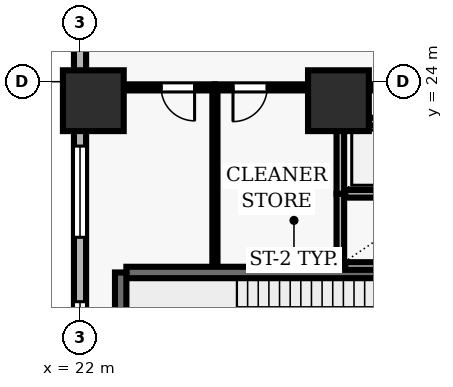
"""IFC4 building model, lengths in metres.
Left out: names, types, materials, properties, quantities, classifications, styles, units other than length and angle.
Written with IfcOpenShell. Run it as: python <this file> out.ifc"""

import sys

from ifc_helpers import new_model, si_unit, direction, frame, frame_2d, origin, origin_2d, place, context, subcontext, project, spatial, rectangle, extrude, element, fill, save


model = new_model("IFC4")
c1 = context("Model", 3, precision=1e-05, world=origin(), true_north=direction((0.0, 1.0)))
c2 = subcontext(c1, "Body", "Model", "MODEL_VIEW")
j1 = project(units=[si_unit("LENGTHUNIT", "METRE"), si_unit("PLANEANGLEUNIT", "RADIAN")], contexts=[c1])
p1 = place(None, origin())
s1 = spatial("IfcSite", under=j1, at=p1, CompositionType="ELEMENT")
p2 = place(p1, origin())
s2 = spatial("IfcBuilding", under=s1, at=p2, CompositionType="ELEMENT")
p3 = place(p2, frame((0.0, 0.0, 5.2)))
s3 = spatial("IfcBuildingStorey", under=s2, at=p3, CompositionType="ELEMENT", Elevation=5.2)
for number, where, z_axis, x_axis in (
    (1, (22.35, 23.5, 0.0), (0.0, 0.0, 1.0), (1.0, 0.0, 0.0)),
    (2, (28.8, 23.5, 0.0), (0.0, 0.0, 1.0), (1.0, 0.0, 0.0)),
):
    element("IfcColumn", number, at=place(p3, frame(where, z_axis=z_axis, x_axis=x_axis)), inside=s3, PredefinedType="COLUMN", context=c2, shape_type="SweptSolid", body=[
        extrude(rectangle(XDim=1.6, YDim=1.6, at=origin_2d()), origin(), (0.0, 0.0, 1.0), 5.2),
    ])
p4 = place(p3, frame((22.0, 51.5, 0.0), z_axis=(0.0, 0.0, 1.0), x_axis=(0.0, -1.0, 0.0)))
e3 = element("IfcWall", 3, at=p4, inside=s3, PredefinedType="SOLIDWALL", context=c2, shape_type="SweptSolid", body=[
    extrude(rectangle(XDim=49.0, YDim=0.32, at=frame_2d((24.5, 0.0))), origin(), (0.0, 0.0, 1.0), 4.92),
])
p5 = place(p4, frame((1.522, 0.0, 0.9)))
e4 = element("IfcOpeningElement", 4, at=p5, cuts=e3, PredefinedType="OPENING", context=c2, shape_type="SweptSolid", body=[
    extrude(rectangle(XDim=2.4, YDim=2.2, at=frame_2d((1.2, 1.1))), frame((0.0, 0.17, 0.0), z_axis=(0.0, -1.0, 0.0), x_axis=(1.0, 0.0, 0.0)), (0.0, 0.0, 1.0), 0.34),
])
p6 = place(p4, frame((6.967, 0.0, 0.9)))
e5 = element("IfcOpeningElement", 5, at=p6, cuts=e3, PredefinedType="OPENING", context=c2, shape_type="SweptSolid", body=[
    extrude(rectangle(XDim=2.4, YDim=2.2, at=frame_2d((1.2, 1.1))), frame((0.0, 0.17, 0.0), z_axis=(0.0, -1.0, 0.0), x_axis=(1.0, 0.0, 0.0)), (0.0, 0.0, 1.0), 0.34),
])
p7 = place(p4, frame((11.961, 0.0, 0.9)))
e6 = element("IfcOpeningElement", 6, at=p7, cuts=e3, PredefinedType="OPENING", context=c2, shape_type="SweptSolid", body=[
    extrude(rectangle(XDim=2.4, YDim=2.2, at=frame_2d((1.2, 1.1))), frame((0.0, 0.17, 0.0), z_axis=(0.0, -1.0, 0.0), x_axis=(1.0, 0.0, 0.0)), (0.0, 0.0, 1.0), 0.34),
])
p8 = place(p4, frame((17.856, 0.0, 0.9)))
e7 = element("IfcOpeningElement", 7, at=p8, cuts=e3, PredefinedType="OPENING", context=c2, shape_type="SweptSolid", body=[
    extrude(rectangle(XDim=2.4, YDim=2.2, at=frame_2d((1.2, 1.1))), frame((0.0, 0.17, 0.0), z_axis=(0.0, -1.0, 0.0), x_axis=(1.0, 0.0, 0.0)), (0.0, 0.0, 1.0), 0.34),
])
p9 = place(p4, frame((22.4, 0.0, 0.9)))
e8 = element("IfcOpeningElement", 8, at=p9, cuts=e3, PredefinedType="OPENING", context=c2, shape_type="SweptSolid", body=[
    extrude(rectangle(XDim=2.4, YDim=2.2, at=frame_2d((1.2, 1.1))), frame((0.0, 0.17, 0.0), z_axis=(0.0, -1.0, 0.0), x_axis=(1.0, 0.0, 0.0)), (0.0, 0.0, 1.0), 0.34),
])
p10 = place(p4, frame((29.194, 0.0, 0.9)))
e9 = element("IfcOpeningElement", 9, at=p10, cuts=e3, PredefinedType="OPENING", context=c2, shape_type="SweptSolid", body=[
    extrude(rectangle(XDim=2.4, YDim=2.2, at=frame_2d((1.2, 1.1))), frame((0.0, 0.17, 0.0), z_axis=(0.0, -1.0, 0.0), x_axis=(1.0, 0.0, 0.0)), (0.0, 0.0, 1.0), 0.34),
])
p11 = place(p4, frame((33.289, 0.0, 0.9)))
e10 = element("IfcOpeningElement", 10, at=p11, cuts=e3, PredefinedType="OPENING", context=c2, shape_type="SweptSolid", body=[
    extrude(rectangle(XDim=2.4, YDim=2.2, at=frame_2d((1.2, 1.1))), frame((0.0, 0.17, 0.0), z_axis=(0.0, -1.0, 0.0), x_axis=(1.0, 0.0, 0.0)), (0.0, 0.0, 1.0), 0.34),
])
p12 = place(p4, frame((39.633, 0.0, 0.9)))
e11 = element("IfcOpeningElement", 11, at=p12, cuts=e3, PredefinedType="OPENING", context=c2, shape_type="SweptSolid", body=[
    extrude(rectangle(XDim=2.4, YDim=2.2, at=frame_2d((1.2, 1.1))), frame((0.0, 0.17, 0.0), z_axis=(0.0, -1.0, 0.0), x_axis=(1.0, 0.0, 0.0)), (0.0, 0.0, 1.0), 0.34),
])
p13 = place(p3, frame((31.58, 18.98, 0.0), z_axis=(0.0, 0.0, 1.0), x_axis=(-1.0, 0.0, 0.0)))
e12 = element("IfcWall", 12, at=p13, inside=s3, PredefinedType="SHEAR", context=c2, shape_type="SweptSolid", body=[
    extrude(rectangle(XDim=8.36, YDim=0.3, at=frame_2d((4.18, 0.0))), origin(), (0.0, 0.0, 1.0), 4.92),
])
p14 = place(p3, frame((23.07, 18.98, 0.0), z_axis=(0.0, 0.0, 1.0), x_axis=(0.0, -1.0, 0.0)))
e13 = element("IfcWall", 13, at=p14, inside=s3, PredefinedType="SHEAR", context=c2, shape_type="SweptSolid", body=[
    extrude(rectangle(XDim=3.51, YDim=0.3, at=frame_2d((1.755, 0.0))), origin(), (0.0, 0.0, 1.0), 4.92),
])
p15 = place(p3, frame((28.85, 21.05, 0.0), z_axis=(0.0, 0.0, 1.0), x_axis=(0.0, -1.0, 0.0)))
e14 = element("IfcWall", 14, at=p15, inside=s3, PredefinedType="SOLIDWALL", context=c2, shape_type="SweptSolid", body=[
    extrude(rectangle(XDim=1.9, YDim=0.2, at=frame_2d((0.95, 0.0))), origin(), (0.0, 0.0, 1.0), 4.92),
])
for number, where, z_axis, x_axis in (
    (15, (28.98, 19.15, 0.0), (0.0, 0.0, 1.0), (1.0, 0.0, 0.0)),
    (16, (31.42, 21.05, 0.0), (0.0, 0.0, 1.0), (-1.0, 0.0, 0.0)),
):
    element("IfcWall", number, at=place(p3, frame(where, z_axis=z_axis, x_axis=x_axis)), inside=s3, PredefinedType="SOLIDWALL", context=c2, shape_type="SweptSolid", body=[
        extrude(rectangle(XDim=2.44, YDim=0.2, at=frame_2d((1.22, 0.0))), origin(), (0.0, 0.0, 1.0), 4.92),
    ])
p16 = place(p3, frame((28.85, 22.95, 0.0), z_axis=(0.0, 0.0, 1.0), x_axis=(0.0, -1.0, 0.0)))
e17 = element("IfcWall", 17, at=p16, inside=s3, PredefinedType="SOLIDWALL", context=c2, shape_type="SweptSolid", body=[
    extrude(rectangle(XDim=1.9, YDim=0.2, at=frame_2d((0.95, 0.0))), origin(), (0.0, 0.0, 1.0), 4.92),
])
p17 = place(p3, frame((31.43, 22.95, 0.0), z_axis=(0.0, 0.0, 1.0), x_axis=(-1.0, 0.0, 0.0)))
e18 = element("IfcWall", 18, at=p17, inside=s3, PredefinedType="SOLIDWALL", context=c2, shape_type="SweptSolid", body=[
    extrude(rectangle(XDim=2.46, YDim=0.2, at=frame_2d((1.23, 0.0))), origin(), (0.0, 0.0, 1.0), 4.92),
])
p18 = place(p3, frame((25.55, 23.85, 0.0), z_axis=(0.0, 0.0, 1.0), x_axis=(-1.0, 0.0, 0.0)))
e19 = element("IfcWall", 19, at=p18, inside=s3, PredefinedType="PARTITIONING", context=c2, shape_type="SweptSolid", body=[
    extrude(rectangle(XDim=3.35, YDim=0.16, at=frame_2d((1.675, 0.0))), origin(), (0.0, 0.0, 1.0), 4.065),
])
p19 = place(p18, frame((0.535, 0.0, 0.0)))
e20 = element("IfcOpeningElement", 20, at=p19, cuts=e19, PredefinedType="OPENING", context=c2, shape_type="SweptSolid", body=[
    extrude(rectangle(XDim=0.88, YDim=2.1, at=frame_2d((0.44, 1.05))), frame((0.0, 0.09, 0.0), z_axis=(0.0, -1.0, 0.0), x_axis=(1.0, 0.0, 0.0)), (0.0, 0.0, 1.0), 0.18),
])
p20 = place(p3, frame((28.8, 23.85, 0.0), z_axis=(0.0, 0.0, 1.0), x_axis=(-1.0, 0.0, 0.0)))
e21 = element("IfcWall", 21, at=p20, inside=s3, PredefinedType="PARTITIONING", context=c2, shape_type="SweptSolid", body=[
    extrude(rectangle(XDim=3.25, YDim=0.16, at=frame_2d((1.625, 0.0))), origin(), (0.0, 0.0, 1.0), 4.065),
])
p21 = place(p20, frame((1.875, 0.0, 0.0)))
e22 = element("IfcOpeningElement", 22, at=p21, cuts=e21, PredefinedType="OPENING", context=c2, shape_type="SweptSolid", body=[
    extrude(rectangle(XDim=0.9, YDim=2.1, at=frame_2d((0.45, 1.05))), frame((0.0, 0.09, 0.0), z_axis=(0.0, -1.0, 0.0), x_axis=(1.0, 0.0, 0.0)), (0.0, 0.0, 1.0), 0.18),
])
p22 = place(p3, frame((28.8, 23.85, 0.0), z_axis=(0.0, 0.0, 1.0), x_axis=(1.0, 0.0, 0.0)))
e23 = element("IfcWall", 23, at=p22, inside=s3, PredefinedType="PARTITIONING", context=c2, shape_type="SweptSolid", body=[
    extrude(rectangle(XDim=2.85, YDim=0.16, at=frame_2d((1.425, 0.0))), origin(), (0.0, 0.0, 1.0), 4.92),
])
p23 = place(p3, frame((25.55, 19.16, 0.0), z_axis=(0.0, 0.0, 1.0), x_axis=(0.0, 1.0, 0.0)))
e24 = element("IfcWall", 24, at=p23, inside=s3, PredefinedType="PARTITIONING", context=c2, shape_type="SweptSolid", body=[
    extrude(rectangle(XDim=4.615, YDim=0.135, at=frame_2d((2.308, 0.0))), origin(), (0.0, 0.0, 1.0), 4.92),
])
p24 = place(p3, frame((28.8, 22.95, 0.0), z_axis=(0.0, 0.0, 1.0), x_axis=(0.0, 1.0, 0.0)))
e25 = element("IfcWall", 25, at=p24, inside=s3, PredefinedType="PARTITIONING", context=c2, shape_type="SweptSolid", body=[
    extrude(rectangle(XDim=0.825, YDim=0.125, at=frame_2d((0.413, 0.0))), origin(), (0.0, 0.0, 1.0), 4.92),
])
p25 = place(p10, origin())
e26 = element("IfcWindow", 26, at=p25, inside=s3, PartitioningType="SINGLE_PANEL", PredefinedType="WINDOW", context=c2, shape_type="SweptSolid", body=[
    extrude(rectangle(XDim=2.4, YDim=2.2, at=frame_2d((1.2, 1.1))), frame((0.0, 0.03, 0.0), z_axis=(0.0, -1.0, 0.0), x_axis=(1.0, 0.0, 0.0)), (0.0, 0.0, 1.0), 0.06),
])
fill(e9, e26)
p26 = place(p11, origin())
e27 = element("IfcWindow", 27, at=p26, inside=s3, PartitioningType="SINGLE_PANEL", PredefinedType="WINDOW", context=c2, shape_type="SweptSolid", body=[
    extrude(rectangle(XDim=2.4, YDim=2.2, at=frame_2d((1.2, 1.1))), frame((0.0, 0.03, 0.0), z_axis=(0.0, -1.0, 0.0), x_axis=(1.0, 0.0, 0.0)), (0.0, 0.0, 1.0), 0.06),
])
fill(e10, e27)
p27 = place(p19, origin())
e28 = element("IfcDoor", 28, at=p27, inside=s3, OperationType="SINGLE_SWING_LEFT", PredefinedType="DOOR", context=c2, shape_type="SweptSolid", body=[
    extrude(rectangle(XDim=0.88, YDim=2.1, at=frame_2d((0.44, 1.05))), frame((0.0, 0.025, 0.0), z_axis=(0.0, -1.0, 0.0), x_axis=(1.0, 0.0, 0.0)), (0.0, 0.0, 1.0), 0.05),
])
fill(e20, e28)
p28 = place(p21, origin())
e29 = element("IfcDoor", 29, at=p28, inside=s3, OperationType="SINGLE_SWING_RIGHT", PredefinedType="DOOR", context=c2, shape_type="SweptSolid", body=[
    extrude(rectangle(XDim=0.9, YDim=2.1, at=frame_2d((0.45, 1.05))), frame((0.0, 0.025, 0.0), z_axis=(0.0, -1.0, 0.0), x_axis=(1.0, 0.0, 0.0)), (0.0, 0.0, 1.0), 0.05),
])
fill(e22, e29)
save(model, sys.argv[1])
